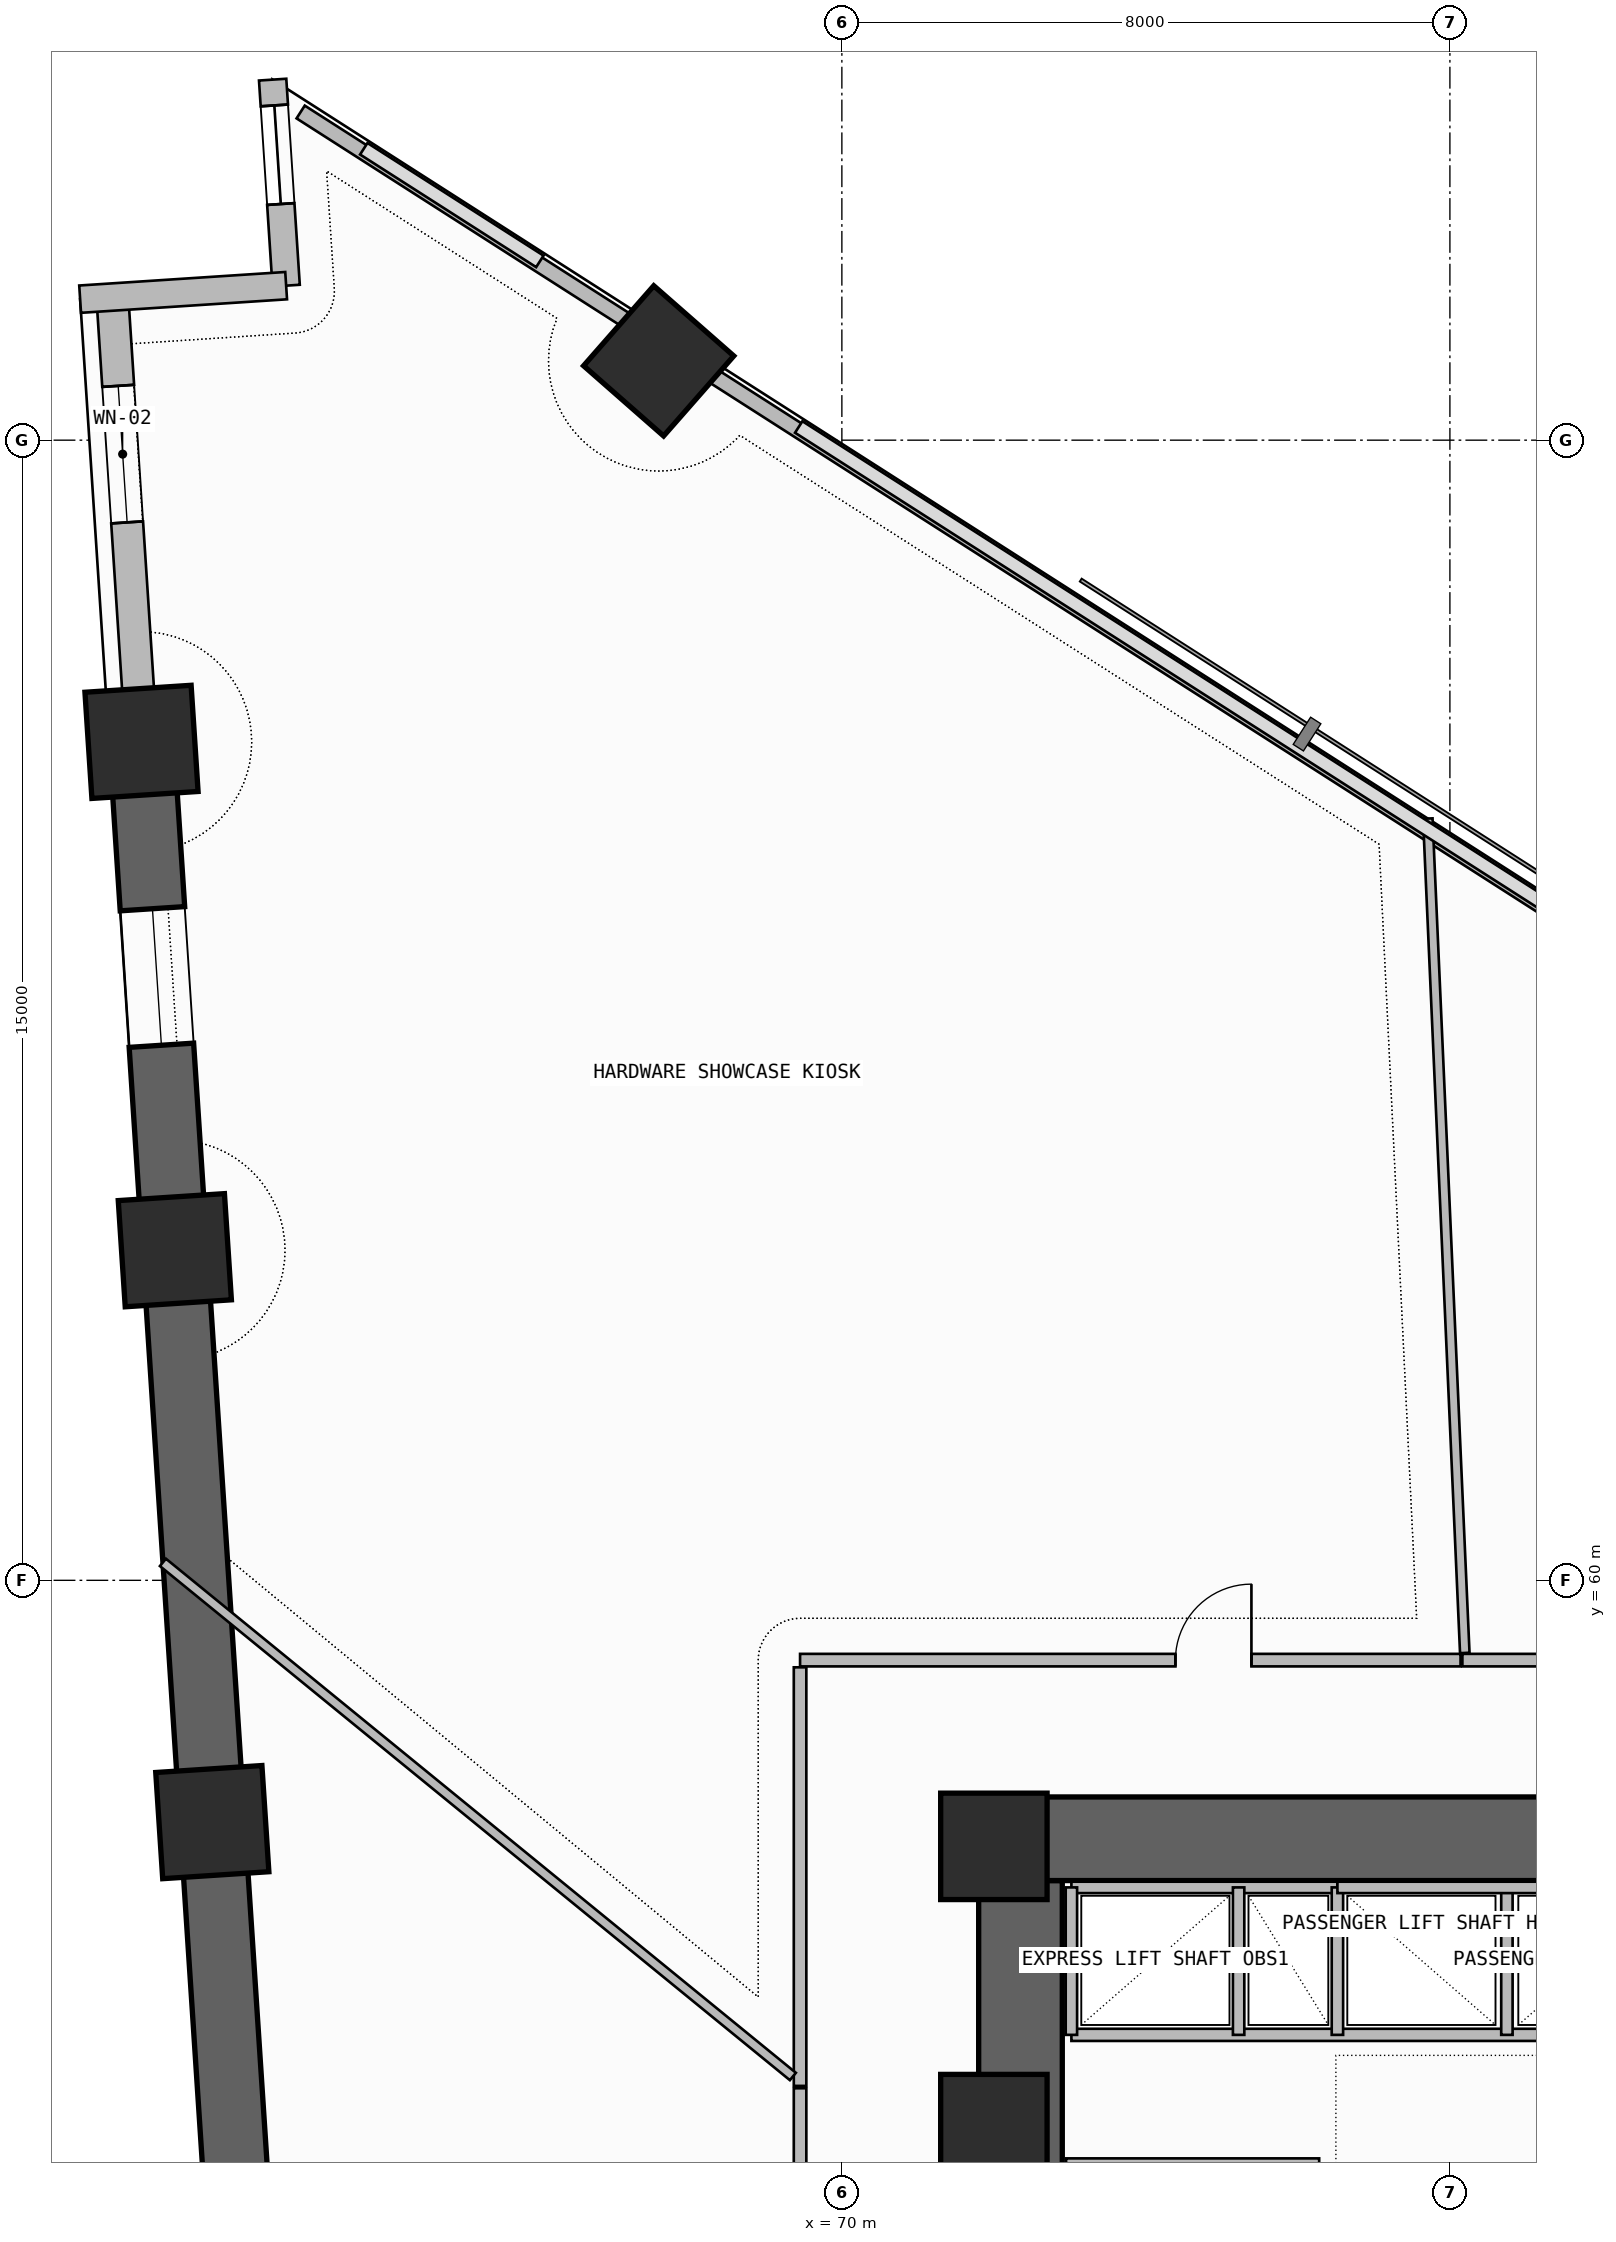
"""IFC4 building model, lengths in metres.
Left out: names, types, materials, properties, quantities, classifications, styles, units other than length and angle.
Written with IfcOpenShell. Run it as: python <this file> out.ifc"""

import sys

from ifc_helpers import new_model, si_unit, direction, frame, frame_2d, origin, origin_2d, place, context, subcontext, project, spatial, rectangle, extrude, element, fill, save


model = new_model("IFC4")
c1 = context("Model", 3, precision=1e-05, world=origin(), true_north=direction((0.0, 1.0)))
c2 = subcontext(c1, "Body", "Model", "MODEL_VIEW")
j1 = project(units=[si_unit("LENGTHUNIT", "METRE"), si_unit("PLANEANGLEUNIT", "RADIAN")], contexts=[c1])
p1 = place(None, origin())
s1 = spatial("IfcSite", under=j1, at=p1, CompositionType="ELEMENT")
p2 = place(p1, origin())
s2 = spatial("IfcBuilding", under=s1, at=p2, CompositionType="ELEMENT")
p3 = place(p2, frame((0.0, 0.0, 74.1)))
s3 = spatial("IfcBuildingStorey", under=s2, at=p3, CompositionType="ELEMENT", Elevation=74.1)
p4 = place(p3, frame((72.35, 43.35, -0.26), z_axis=(0.0, 0.0, 1.0), x_axis=(0.0, 1.0, 0.0)))
e1 = element("IfcWall", 1, at=p4, inside=s3, PredefinedType="SHEAR", context=c2, shape_type="SweptSolid", body=[
    extrude(rectangle(XDim=12.7, YDim=1.1, at=frame_2d((6.35, 0.0))), origin(), (0.0, 0.0, 1.0), 3.6),
])
p5 = place(p4, frame((1.35, 0.0, 0.26)))
e2 = element("IfcOpeningElement", 2, at=p5, cuts=e1, PredefinedType="OPENING", context=c2, shape_type="SweptSolid", body=[
    extrude(rectangle(XDim=1.2, YDim=2.2, at=frame_2d((0.6, 1.1))), frame((0.0, 0.56, 0.0), z_axis=(0.0, -1.0, 0.0), x_axis=(1.0, 0.0, 0.0)), (0.0, 0.0, 1.0), 1.12),
])
p6 = place(p3, frame((71.8, 56.6, -0.26), z_axis=(0.0, 0.0, 1.0), x_axis=(1.0, 0.0, 0.0)))
e3 = element("IfcWall", 3, at=p6, inside=s3, PredefinedType="SHEAR", context=c2, shape_type="SweptSolid", body=[
    extrude(rectangle(XDim=14.3, YDim=1.1, at=frame_2d((7.15, 0.0))), origin(), (0.0, 0.0, 1.0), 3.6),
])
for number, where, z_axis, x_axis in (
    (4, (72.0, 52.8, 0.0), (0.0, 0.0, 1.0), (1.0, 0.0, 0.0)),
    (5, (72.0, 56.5, 0.0), (0.0, 0.0, 1.0), (1.0, 0.0, 0.0)),
    (6, (67.59, 76.043, 0.0), (0.0, 0.0, 1.0), (0.659, 0.752, 0.0)),
    (7, (60.785, 71.031, 0.0), (0.0, 0.0, 1.0), (-0.065, 0.998, 0.0)),
    (8, (61.224, 64.343, 0.0), (0.0, 0.0, 1.0), (-0.065, 0.998, 0.0)),
    (9, (61.717, 56.819, 0.0), (0.0, 0.0, 1.0), (-0.065, 0.998, 0.0)),
):
    element("IfcColumn", number, at=place(p3, frame(where, z_axis=z_axis, x_axis=x_axis)), inside=s3, PredefinedType="COLUMN", context=c2, shape_type="SweptSolid", body=[
        extrude(rectangle(XDim=1.4, YDim=1.4, at=origin_2d()), origin(), (0.0, 0.0, 1.0), 3.6),
    ])
p7 = place(p3, frame((60.402, 76.883, 0.0), z_axis=(0.0, 0.0, 1.0), x_axis=(0.065402662459, -0.997858953832, 0.0)))
e10 = element("IfcWall", 10, at=p7, inside=s3, PredefinedType="SOLIDWALL", context=c2, shape_type="SweptSolid", body=[
    extrude(rectangle(XDim=5.864, YDim=0.42, at=frame_2d((2.932, 0.0))), origin(), (0.0, 0.0, 1.0), 2.725),
])
p8 = place(p7, frame((1.171, 0.0, 1.2)))
e11 = element("IfcOpeningElement", 11, at=p8, cuts=e10, PredefinedType="OPENING", context=c2, shape_type="SweptSolid", body=[
    extrude(rectangle(XDim=1.8, YDim=0.9, at=frame_2d((0.9, 0.45))), frame((0.0, 0.22, 0.0), z_axis=(0.0, -1.0, 0.0), x_axis=(1.0, 0.0, 0.0)), (0.0, 0.0, 1.0), 0.44),
])
p9 = place(p3, frame((60.785, 71.031, -0.26), z_axis=(0.0, 0.0, 1.0), x_axis=(0.065409824833, -0.997858484363, 0.0)))
e12 = element("IfcWall", 12, at=p9, inside=s3, PredefinedType="SHEAR", context=c2, shape_type="SweptSolid", body=[
    extrude(rectangle(XDim=21.783, YDim=0.85, at=frame_2d((10.891, 0.0))), origin(), (0.0, 0.0, 1.0), 3.6),
])
p10 = place(p9, frame((2.2, 0.0, 1.2)))
e13 = element("IfcOpeningElement", 13, at=p10, cuts=e12, PredefinedType="OPENING", context=c2, shape_type="SweptSolid", body=[
    extrude(rectangle(XDim=1.8, YDim=0.9, at=frame_2d((0.9, 0.45))), frame((0.0, 0.435, 0.0), z_axis=(0.0, -1.0, 0.0), x_axis=(1.0, 0.0, 0.0)), (0.0, 0.0, 1.0), 0.87),
])
p11 = place(p3, frame((62.511, 79.743, 0.0), z_axis=(0.0, 0.0, 1.0), x_axis=(0.065337885661, -0.997863197386, 0.0)))
e14 = element("IfcWall", 14, at=p11, inside=s3, PredefinedType="SOLIDWALL", context=c2, shape_type="SweptSolid", body=[
    extrude(rectangle(XDim=2.717, YDim=0.36, at=frame_2d((1.358, 0.0))), origin(), (0.0, 0.0, 1.0), 3.34),
])
p12 = place(p11, frame((0.34, 0.0, 0.45)))
e15 = element("IfcOpeningElement", 15, at=p12, cuts=e14, PredefinedType="OPENING", context=c2, shape_type="SweptSolid", body=[
    extrude(rectangle(XDim=1.3, YDim=2.4, at=frame_2d((0.65, 1.2))), frame((0.0, 0.19, 0.0), z_axis=(0.0, -1.0, 0.0), x_axis=(1.0, 0.0, 0.0)), (0.0, 0.0, 1.0), 0.38),
])
p13 = place(p3, frame((62.688, 77.033, 0.0), z_axis=(0.0, 0.0, 1.0), x_axis=(-0.99785694905, -0.065433242561, 0.0)))
e16 = element("IfcWall", 16, at=p13, inside=s3, PredefinedType="SOLIDWALL", context=c2, shape_type="SweptSolid", body=[
    extrude(rectangle(XDim=2.716, YDim=0.36, at=frame_2d((1.358, 0.0))), origin(), (0.0, 0.0, 1.0), 3.34),
])
p14 = place(p3, frame((84.682, 65.372, 0.0), z_axis=(0.0, 0.0, 1.0), x_axis=(-0.842418773655, 0.538823356763, 0.0)))
e17 = element("IfcWall", 17, at=p14, inside=s3, PredefinedType="PARAPET", context=c2, shape_type="SweptSolid", body=[
    extrude(rectangle(XDim=19.612, YDim=0.2, at=frame_2d((9.806, 0.0))), origin(), (0.0, 0.0, 1.0), 1.15),
])
p15 = place(p3, frame((67.257, 76.518, 0.0), z_axis=(0.0, 0.0, 1.0), x_axis=(-0.842403631411, 0.538847030042, 0.0)))
e18 = element("IfcWall", 18, at=p15, inside=s3, PredefinedType="PARAPET", context=c2, shape_type="SweptSolid", body=[
    extrude(rectangle(XDim=5.196, YDim=0.2, at=frame_2d((2.598, 0.0))), origin(), (0.0, 0.0, 1.0), 1.15),
])
p16 = place(p3, frame((72.95, 52.32, 0.0), z_axis=(0.0, 0.0, 1.0), x_axis=(1.0, 0.0, 0.0)))
e19 = element("IfcWall", 19, at=p16, inside=s3, PredefinedType="SOLIDWALL", context=c2, shape_type="SweptSolid", body=[
    extrude(rectangle(XDim=3.33, YDim=0.15, at=frame_2d((1.665, 0.0))), origin(), (0.0, 0.0, 1.0), 3.34),
])
p17 = place(p3, frame((73.02, 54.02, 0.0), z_axis=(0.0, 0.0, 1.0), x_axis=(1.0, 0.0, 0.0)))
e20 = element("IfcWall", 20, at=p17, inside=s3, PredefinedType="SOLIDWALL", context=c2, shape_type="SweptSolid", body=[
    extrude(rectangle(XDim=12.08, YDim=0.16, at=frame_2d((6.04, 0.0))), origin(), (0.0, 0.0, 1.0), 3.34),
])
p18 = place(p3, frame((73.02, 55.96, 0.0), z_axis=(0.0, 0.0, 1.0), x_axis=(1.0, 0.0, 0.0)))
e21 = element("IfcWall", 21, at=p18, inside=s3, PredefinedType="SOLIDWALL", context=c2, shape_type="SweptSolid", body=[
    extrude(rectangle(XDim=3.5, YDim=0.15, at=frame_2d((1.75, 0.0))), origin(), (0.0, 0.0, 1.0), 3.34),
])
p19 = place(p3, frame((73.02, 54.02, 0.0), z_axis=(0.0, 0.0, 1.0), x_axis=(0.0, 1.0, 0.0)))
e22 = element("IfcWall", 22, at=p19, inside=s3, PredefinedType="PLUMBINGWALL", context=c2, shape_type="SweptSolid", body=[
    extrude(rectangle(XDim=1.94, YDim=0.15, at=frame_2d((0.97, 0.0))), origin(), (0.0, 0.0, 1.0), 3.34),
])
p20 = place(p3, frame((76.52, 54.02, 0.0), z_axis=(0.0, 0.0, 1.0), x_axis=(0.0, 1.0, 0.0)))
e23 = element("IfcWall", 23, at=p20, inside=s3, PredefinedType="SOLIDWALL", context=c2, shape_type="SweptSolid", body=[
    extrude(rectangle(XDim=1.94, YDim=0.15, at=frame_2d((0.97, 0.0))), origin(), (0.0, 0.0, 1.0), 3.34),
])
p21 = place(p3, frame((75.22, 54.02, 0.0), z_axis=(0.0, 0.0, 1.0), x_axis=(0.0, 1.0, 0.0)))
e24 = element("IfcWall", 24, at=p21, inside=s3, PredefinedType="PLUMBINGWALL", context=c2, shape_type="SweptSolid", body=[
    extrude(rectangle(XDim=1.94, YDim=0.15, at=frame_2d((0.97, 0.0))), origin(), (0.0, 0.0, 1.0), 3.34),
])
p22 = place(p3, frame((78.75, 54.02, 0.0), z_axis=(0.0, 0.0, 1.0), x_axis=(0.0, 1.0, 0.0)))
e25 = element("IfcWall", 25, at=p22, inside=s3, PredefinedType="PLUMBINGWALL", context=c2, shape_type="SweptSolid", body=[
    extrude(rectangle(XDim=1.96, YDim=0.15, at=frame_2d((0.98, 0.0))), origin(), (0.0, 0.0, 1.0), 3.34),
])
p23 = place(p3, frame((76.52, 55.96, 0.0), z_axis=(0.0, 0.0, 1.0), x_axis=(1.0, 0.0, 0.0)))
e26 = element("IfcWall", 26, at=p23, inside=s3, PredefinedType="SOLIDWALL", context=c2, shape_type="SweptSolid", body=[
    extrude(rectangle(XDim=6.7, YDim=0.15, at=frame_2d((3.35, 0.0))), origin(), (0.0, 0.0, 1.0), 3.34),
])
p24 = place(p3, frame((88.15, 58.95, 0.0), z_axis=(0.0, 0.0, 1.0), x_axis=(-1.0, 0.0, 0.0)))
e27 = element("IfcWall", 27, at=p24, inside=s3, PredefinedType="PARTITIONING", context=c2, shape_type="SweptSolid", body=[
    extrude(rectangle(XDim=9.986, YDim=0.165, at=frame_2d((4.993, 0.0))), origin(), (0.0, 0.0, 1.0), 2.725),
])
p25 = place(p24, frame((5.781, 0.0, 0.0)))
e28 = element("IfcOpeningElement", 28, at=p25, cuts=e27, PredefinedType="OPENING", context=c2, shape_type="SweptSolid", body=[
    extrude(rectangle(XDim=1.0, YDim=2.2, at=frame_2d((0.5, 1.1))), frame((0.0, 0.093, 0.0), z_axis=(0.0, -1.0, 0.0), x_axis=(1.0, 0.0, 0.0)), (0.0, 0.0, 1.0), 0.185),
])
p26 = place(p3, frame((78.196, 59.044, 0.0), z_axis=(0.0, 0.0, 1.0), x_axis=(-0.044280871552, 0.999019121146, 0.0)))
e29 = element("IfcWall", 29, at=p26, inside=s3, PredefinedType="PARTITIONING", context=c2, shape_type="SweptSolid", body=[
    extrude(rectangle(XDim=10.988, YDim=0.125, at=frame_2d((5.494, 0.0))), origin(), (0.0, 0.0, 1.0), 2.875),
])
p27 = place(p3, frame((78.14, 58.95, 0.0), z_axis=(0.0, 0.0, 1.0), x_axis=(-1.0, 0.0, 0.0)))
e30 = element("IfcWall", 30, at=p27, inside=s3, PredefinedType="PARTITIONING", context=c2, shape_type="SweptSolid", body=[
    extrude(rectangle(XDim=8.69, YDim=0.165, at=frame_2d((4.345, 0.0))), origin(), (0.0, 0.0, 1.0), 2.725),
])
p28 = place(p27, frame((2.751, 0.0, 0.0)))
e31 = element("IfcOpeningElement", 31, at=p28, cuts=e30, PredefinedType="OPENING", context=c2, shape_type="SweptSolid", body=[
    extrude(rectangle(XDim=1.0, YDim=2.2, at=frame_2d((0.5, 1.1))), frame((0.0, 0.093, 0.0), z_axis=(0.0, -1.0, 0.0), x_axis=(1.0, 0.0, 0.0)), (0.0, 0.0, 1.0), 0.185),
])
p29 = place(p3, frame((69.45, 58.855, 0.0), z_axis=(0.0, 0.0, 1.0), x_axis=(0.0, -1.0, 0.0)))
e32 = element("IfcWall", 32, at=p29, inside=s3, PredefinedType="PARTITIONING", context=c2, shape_type="SweptSolid", body=[
    extrude(rectangle(XDim=5.507, YDim=0.165, at=frame_2d((2.753, 0.0))), origin(), (0.0, 0.0, 1.0), 2.725),
])
p30 = place(p3, frame((69.355, 53.472, 0.0), z_axis=(0.0, 0.0, 1.0), x_axis=(-0.774767054574, 0.632246796074, 0.0)))
e33 = element("IfcWall", 33, at=p30, inside=s3, PredefinedType="PARTITIONING", context=c2, shape_type="SweptSolid", body=[
    extrude(rectangle(XDim=10.698, YDim=0.125, at=frame_2d((5.349, 0.0))), origin(), (0.0, 0.0, 1.0), 2.325),
])
p31 = place(p3, frame((69.45, 53.317, 0.0), z_axis=(0.0, 0.0, 1.0), x_axis=(0.0, -1.0, 0.0)))
e34 = element("IfcWall", 34, at=p31, inside=s3, PredefinedType="PARTITIONING", context=c2, shape_type="SweptSolid", body=[
    extrude(rectangle(XDim=9.025, YDim=0.165, at=frame_2d((4.513, 0.0))), origin(), (0.0, 0.0, 1.0), 2.725),
])
p32 = place(p31, frame((4.013, 0.0, 0.0)))
e35 = element("IfcOpeningElement", 35, at=p32, cuts=e34, PredefinedType="OPENING", context=c2, shape_type="SweptSolid", body=[
    extrude(rectangle(XDim=1.0, YDim=2.2, at=frame_2d((0.5, 1.1))), frame((0.0, 0.093, 0.0), z_axis=(0.0, -1.0, 0.0), x_axis=(1.0, 0.0, 0.0)), (0.0, 0.0, 1.0), 0.185),
])
p33 = place(p8, origin())
e36 = element("IfcWindow", 36, at=p33, inside=s3, PartitioningType="SINGLE_PANEL", PredefinedType="WINDOW", context=c2, shape_type="SweptSolid", body=[
    extrude(rectangle(XDim=1.8, YDim=0.9, at=frame_2d((0.9, 0.45))), frame((0.0, 0.03, 0.0), z_axis=(0.0, -1.0, 0.0), x_axis=(1.0, 0.0, 0.0)), (0.0, 0.0, 1.0), 0.06),
])
fill(e11, e36)
p34 = place(p10, origin())
e37 = element("IfcWindow", 37, at=p34, inside=s3, PartitioningType="SINGLE_PANEL", PredefinedType="WINDOW", context=c2, shape_type="SweptSolid", body=[
    extrude(rectangle(XDim=1.8, YDim=0.9, at=frame_2d((0.9, 0.45))), frame((0.0, 0.03, 0.0), z_axis=(0.0, -1.0, 0.0), x_axis=(1.0, 0.0, 0.0)), (0.0, 0.0, 1.0), 0.06),
])
fill(e13, e37)
p35 = place(p12, origin())
e38 = element("IfcWindow", 38, at=p35, inside=s3, PartitioningType="SINGLE_PANEL", PredefinedType="WINDOW", context=c2, shape_type="SweptSolid", body=[
    extrude(rectangle(XDim=1.3, YDim=2.4, at=frame_2d((0.65, 1.2))), frame((0.0, 0.03, 0.0), z_axis=(0.0, -1.0, 0.0), x_axis=(1.0, 0.0, 0.0)), (0.0, 0.0, 1.0), 0.06),
])
fill(e15, e38)
p36 = place(p28, frame((1.0, 0.0, 0.0), z_axis=(0.0, 0.0, 1.0), x_axis=(-1.0, 0.0, 0.0)))
e39 = element("IfcDoor", 39, at=p36, inside=s3, OperationType="SINGLE_SWING_RIGHT", PredefinedType="DOOR", context=c2, shape_type="SweptSolid", body=[
    extrude(rectangle(XDim=1.0, YDim=2.2, at=frame_2d((0.5, 1.1))), frame((0.0, 0.025, 0.0), z_axis=(0.0, -1.0, 0.0), x_axis=(1.0, 0.0, 0.0)), (0.0, 0.0, 1.0), 0.05),
])
fill(e31, e39)
save(model, sys.argv[1])
